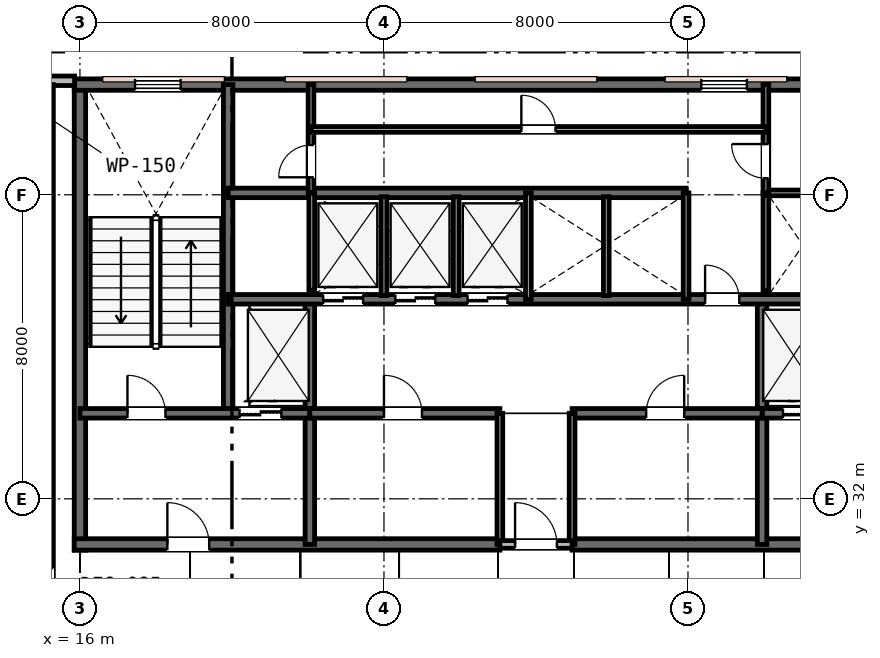
"""IFC4 building model, lengths in metres.
Left out: names, types, materials, properties, quantities, classifications, styles, units other than length and angle.
Written with IfcOpenShell. Run it as: python <this file> out.ifc"""

import sys

from ifc_helpers import new_model, si_unit, direction, frame, frame_2d, origin, place, context, subcontext, project, spatial, rectangle, extrude, element, fill, save


model = new_model("IFC4")
c1 = context("Model", 3, precision=1e-05, world=origin(), true_north=direction((0.0, 1.0)))
c2 = subcontext(c1, "Body", "Model", "MODEL_VIEW")
j1 = project(units=[si_unit("LENGTHUNIT", "METRE"), si_unit("PLANEANGLEUNIT", "RADIAN")], contexts=[c1])
p1 = place(None, origin())
s1 = spatial("IfcSite", under=j1, at=p1, CompositionType="ELEMENT")
p2 = place(p1, origin())
s2 = spatial("IfcBuilding", under=s1, at=p2, CompositionType="ELEMENT")
p3 = place(p2, frame((0.0, 0.0, 283.0)))
s3 = spatial("IfcBuildingStorey", under=s2, at=p3, CompositionType="ELEMENT", Elevation=283.0)
p4 = place(p3, frame((16.0, 30.65, 0.0), z_axis=(0.0, 0.0, 1.0), x_axis=(0.0, 1.0, 0.0)))
e1 = element("IfcWall", 1, at=p4, inside=s3, PredefinedType="SHEAR", context=c2, shape_type="SweptSolid", body=[
    extrude(rectangle(XDim=12.3, YDim=0.3, at=frame_2d((6.15, 0.0))), origin(), (0.0, 0.0, 1.0), 3.8),
])
p5 = place(p3, frame((15.85, 42.9, 0.0), z_axis=(0.0, 0.0, 1.0), x_axis=(1.0, 0.0, 0.0)))
e2 = element("IfcWall", 2, at=p5, inside=s3, PredefinedType="SHEAR", context=c2, shape_type="SweptSolid", body=[
    extrude(rectangle(XDim=24.3, YDim=0.3, at=frame_2d((12.15, 0.0))), origin(), (0.0, 0.0, 1.0), 3.8),
])
p6 = place(p5, frame((1.6, 0.0, 0.95)))
e3 = element("IfcOpeningElement", 3, at=p6, cuts=e2, PredefinedType="OPENING", context=c2, shape_type="SweptSolid", body=[
    extrude(rectangle(XDim=1.2, YDim=1.6, at=frame_2d((0.6, 0.8))), frame((0.0, 0.16, 0.0), z_axis=(0.0, -1.0, 0.0), x_axis=(1.0, 0.0, 0.0)), (0.0, 0.0, 1.0), 0.32),
])
p7 = place(p5, frame((16.5, 0.0, 0.95)))
e4 = element("IfcOpeningElement", 4, at=p7, cuts=e2, PredefinedType="OPENING", context=c2, shape_type="SweptSolid", body=[
    extrude(rectangle(XDim=1.2, YDim=1.6, at=frame_2d((0.6, 0.8))), frame((0.0, 0.16, 0.0), z_axis=(0.0, -1.0, 0.0), x_axis=(1.0, 0.0, 0.0)), (0.0, 0.0, 1.0), 0.32),
])
p8 = place(p5, frame((21.6, 0.0, 0.95)))
e5 = element("IfcOpeningElement", 5, at=p8, cuts=e2, PredefinedType="OPENING", context=c2, shape_type="SweptSolid", body=[
    extrude(rectangle(XDim=1.2, YDim=1.6, at=frame_2d((0.6, 0.8))), frame((0.0, 0.16, 0.0), z_axis=(0.0, -1.0, 0.0), x_axis=(1.0, 0.0, 0.0)), (0.0, 0.0, 1.0), 0.32),
])
p9 = place(p3, frame((15.85, 30.8, 0.0), z_axis=(0.0, 0.0, 1.0), x_axis=(1.0, 0.0, 0.0)))
e6 = element("IfcWall", 6, at=p9, inside=s3, PredefinedType="SHEAR", context=c2, shape_type="SweptSolid", body=[
    extrude(rectangle(XDim=11.2, YDim=0.3, at=frame_2d((5.6, 0.0))), origin(), (0.0, 0.0, 1.0), 3.8),
])
p10 = place(p9, frame((2.45, 0.0, 0.0)))
e7 = element("IfcOpeningElement", 7, at=p10, cuts=e6, PredefinedType="OPENING", context=c2, shape_type="SweptSolid", body=[
    extrude(rectangle(XDim=1.1, YDim=2.15, at=frame_2d((0.55, 1.075))), frame((0.0, 0.16, 0.0), z_axis=(0.0, -1.0, 0.0), x_axis=(1.0, 0.0, 0.0)), (0.0, 0.0, 1.0), 0.32),
])
p11 = place(p3, frame((28.95, 30.8, 0.0), z_axis=(0.0, 0.0, 1.0), x_axis=(1.0, 0.0, 0.0)))
e8 = element("IfcWall", 8, at=p11, inside=s3, PredefinedType="SHEAR", context=c2, shape_type="SweptSolid", body=[
    extrude(rectangle(XDim=11.2, YDim=0.3, at=frame_2d((5.6, 0.0))), origin(), (0.0, 0.0, 1.0), 3.8),
])
p12 = place(p11, frame((7.65, 0.0, 0.0)))
e9 = element("IfcOpeningElement", 9, at=p12, cuts=e8, PredefinedType="OPENING", context=c2, shape_type="SweptSolid", body=[
    extrude(rectangle(XDim=1.1, YDim=2.15, at=frame_2d((0.55, 1.075))), frame((0.0, 0.16, 0.0), z_axis=(0.0, -1.0, 0.0), x_axis=(1.0, 0.0, 0.0)), (0.0, 0.0, 1.0), 0.32),
])
p13 = place(p3, frame((19.9, 34.25, 0.0), z_axis=(0.0, 0.0, 1.0), x_axis=(0.0, 1.0, 0.0)))
e10 = element("IfcWall", 10, at=p13, inside=s3, PredefinedType="SHEAR", context=c2, shape_type="SweptSolid", body=[
    extrude(rectangle(XDim=8.65, YDim=0.25, at=frame_2d((4.325, 0.0))), origin(), (0.0, 0.0, 1.0), 3.8),
])
for number, where, z_axis, x_axis in (
    (11, (22.05, 30.8, 0.0), (0.0, 0.0, 1.0), (0.0, 1.0, 0.0)),
    (12, (33.95, 30.8, 0.0), (0.0, 0.0, 1.0), (0.0, 1.0, 0.0)),
):
    element("IfcWall", number, at=place(p3, frame(where, z_axis=z_axis, x_axis=x_axis)), inside=s3, PredefinedType="SHEAR", context=c2, shape_type="SweptSolid", body=[
        extrude(rectangle(XDim=6.45, YDim=0.25, at=frame_2d((3.225, 0.0))), origin(), (0.0, 0.0, 1.0), 3.8),
    ])
p14 = place(p3, frame((16.0, 34.25, 0.0), z_axis=(0.0, 0.0, 1.0), x_axis=(1.0, 0.0, 0.0)))
e13 = element("IfcWall", 13, at=p14, inside=s3, PredefinedType="SHEAR", context=c2, shape_type="SweptSolid", body=[
    extrude(rectangle(XDim=6.05, YDim=0.25, at=frame_2d((3.025, 0.0))), origin(), (0.0, 0.0, 1.0), 3.8),
])
p15 = place(p14, frame((1.25, 0.0, 0.0)))
e14 = element("IfcOpeningElement", 14, at=p15, cuts=e13, PredefinedType="OPENING", context=c2, shape_type="SweptSolid", body=[
    extrude(rectangle(XDim=1.0, YDim=2.15, at=frame_2d((0.5, 1.075))), frame((0.0, 0.135, 0.0), z_axis=(0.0, -1.0, 0.0), x_axis=(1.0, 0.0, 0.0)), (0.0, 0.0, 1.0), 0.27),
])
p16 = place(p14, frame((4.2, 0.0, 0.0)))
e15 = element("IfcOpeningElement", 15, at=p16, cuts=e13, PredefinedType="OPENING", context=c2, shape_type="SweptSolid", body=[
    extrude(rectangle(XDim=1.1, YDim=2.15, at=frame_2d((0.55, 1.075))), frame((0.0, 0.135, 0.0), z_axis=(0.0, -1.0, 0.0), x_axis=(1.0, 0.0, 0.0)), (0.0, 0.0, 1.0), 0.27),
])
p17 = place(p3, frame((33.95, 34.25, 0.0), z_axis=(0.0, 0.0, 1.0), x_axis=(1.0, 0.0, 0.0)))
e16 = element("IfcWall", 16, at=p17, inside=s3, PredefinedType="SHEAR", context=c2, shape_type="SweptSolid", body=[
    extrude(rectangle(XDim=6.05, YDim=0.25, at=frame_2d((3.025, 0.0))), origin(), (0.0, 0.0, 1.0), 3.8),
])
p18 = place(p17, frame((3.7, 0.0, 0.0)))
e17 = element("IfcOpeningElement", 17, at=p18, cuts=e16, PredefinedType="OPENING", context=c2, shape_type="SweptSolid", body=[
    extrude(rectangle(XDim=1.0, YDim=2.15, at=frame_2d((0.5, 1.075))), frame((0.0, 0.135, 0.0), z_axis=(0.0, -1.0, 0.0), x_axis=(1.0, 0.0, 0.0)), (0.0, 0.0, 1.0), 0.27),
])
p19 = place(p17, frame((0.55, 0.0, 0.0)))
e18 = element("IfcOpeningElement", 18, at=p19, cuts=e16, PredefinedType="OPENING", context=c2, shape_type="SweptSolid", body=[
    extrude(rectangle(XDim=1.1, YDim=2.15, at=frame_2d((0.55, 1.075))), frame((0.0, 0.135, 0.0), z_axis=(0.0, -1.0, 0.0), x_axis=(1.0, 0.0, 0.0)), (0.0, 0.0, 1.0), 0.27),
])
p20 = place(p3, frame((22.05, 34.25, 0.0), z_axis=(0.0, 0.0, 1.0), x_axis=(1.0, 0.0, 0.0)))
e19 = element("IfcWall", 19, at=p20, inside=s3, PredefinedType="SHEAR", context=c2, shape_type="SweptSolid", body=[
    extrude(rectangle(XDim=5.0, YDim=0.25, at=frame_2d((2.5, 0.0))), origin(), (0.0, 0.0, 1.0), 3.8),
])
p21 = place(p20, frame((1.95, 0.0, 0.0)))
e20 = element("IfcOpeningElement", 20, at=p21, cuts=e19, PredefinedType="OPENING", context=c2, shape_type="SweptSolid", body=[
    extrude(rectangle(XDim=1.0, YDim=2.15, at=frame_2d((0.5, 1.075))), frame((0.0, 0.135, 0.0), z_axis=(0.0, -1.0, 0.0), x_axis=(1.0, 0.0, 0.0)), (0.0, 0.0, 1.0), 0.27),
])
p22 = place(p3, frame((28.95, 34.25, 0.0), z_axis=(0.0, 0.0, 1.0), x_axis=(1.0, 0.0, 0.0)))
e21 = element("IfcWall", 21, at=p22, inside=s3, PredefinedType="SHEAR", context=c2, shape_type="SweptSolid", body=[
    extrude(rectangle(XDim=5.0, YDim=0.25, at=frame_2d((2.5, 0.0))), origin(), (0.0, 0.0, 1.0), 3.8),
])
p23 = place(p22, frame((1.95, 0.0, 0.0)))
e22 = element("IfcOpeningElement", 22, at=p23, cuts=e21, PredefinedType="OPENING", context=c2, shape_type="SweptSolid", body=[
    extrude(rectangle(XDim=1.0, YDim=2.15, at=frame_2d((0.5, 1.075))), frame((0.0, 0.135, 0.0), z_axis=(0.0, -1.0, 0.0), x_axis=(1.0, 0.0, 0.0)), (0.0, 0.0, 1.0), 0.27),
])
p24 = place(p3, frame((19.9, 37.25, 0.0), z_axis=(0.0, 0.0, 1.0), x_axis=(1.0, 0.0, 0.0)))
e23 = element("IfcWall", 23, at=p24, inside=s3, PredefinedType="SHEAR", context=c2, shape_type="SweptSolid", body=[
    extrude(rectangle(XDim=16.2, YDim=0.25, at=frame_2d((8.1, 0.0))), origin(), (0.0, 0.0, 1.0), 3.8),
])
p25 = place(p24, frame((12.55, 0.0, 0.0)))
e24 = element("IfcOpeningElement", 24, at=p25, cuts=e23, PredefinedType="OPENING", context=c2, shape_type="SweptSolid", body=[
    extrude(rectangle(XDim=0.9, YDim=2.15, at=frame_2d((0.45, 1.075))), frame((0.0, 0.135, 0.0), z_axis=(0.0, -1.0, 0.0), x_axis=(1.0, 0.0, 0.0)), (0.0, 0.0, 1.0), 0.27),
])
p26 = place(p24, frame((2.5, 0.0, 0.0)))
e25 = element("IfcOpeningElement", 25, at=p26, cuts=e23, PredefinedType="OPENING", context=c2, shape_type="SweptSolid", body=[
    extrude(rectangle(XDim=1.05, YDim=2.15, at=frame_2d((0.525, 1.075))), frame((0.0, 0.135, 0.0), z_axis=(0.0, -1.0, 0.0), x_axis=(1.0, 0.0, 0.0)), (0.0, 0.0, 1.0), 0.27),
])
p27 = place(p24, frame((4.4, 0.0, 0.0)))
e26 = element("IfcOpeningElement", 26, at=p27, cuts=e23, PredefinedType="OPENING", context=c2, shape_type="SweptSolid", body=[
    extrude(rectangle(XDim=1.05, YDim=2.15, at=frame_2d((0.525, 1.075))), frame((0.0, 0.135, 0.0), z_axis=(0.0, -1.0, 0.0), x_axis=(1.0, 0.0, 0.0)), (0.0, 0.0, 1.0), 0.27),
])
p28 = place(p24, frame((6.3, 0.0, 0.0)))
e27 = element("IfcOpeningElement", 27, at=p28, cuts=e23, PredefinedType="OPENING", context=c2, shape_type="SweptSolid", body=[
    extrude(rectangle(XDim=1.05, YDim=2.15, at=frame_2d((0.525, 1.075))), frame((0.0, 0.135, 0.0), z_axis=(0.0, -1.0, 0.0), x_axis=(1.0, 0.0, 0.0)), (0.0, 0.0, 1.0), 0.27),
])
p29 = place(p3, frame((19.9, 40.05, 0.0), z_axis=(0.0, 0.0, 1.0), x_axis=(1.0, 0.0, 0.0)))
e28 = element("IfcWall", 28, at=p29, inside=s3, PredefinedType="SHEAR", context=c2, shape_type="SweptSolid", body=[
    extrude(rectangle(XDim=12.05, YDim=0.25, at=frame_2d((6.025, 0.0))), origin(), (0.0, 0.0, 1.0), 3.8),
])
p30 = place(p3, frame((15.86, 43.0, 0.0), z_axis=(0.0, 0.0, 1.0), x_axis=(-1.0, 0.0, 0.0)))
e29 = element("IfcWall", 29, at=p30, inside=s3, PredefinedType="STANDARD", context=c2, shape_type="SweptSolid", body=[
    extrude(rectangle(XDim=4.06, YDim=0.25, at=frame_2d((2.03, 0.0))), origin(), (0.0, 0.0, 1.0), 3.53),
])
p31 = place(p30, frame((1.2, 0.0, 0.85)))
e30 = element("IfcOpeningElement", 30, at=p31, cuts=e29, PredefinedType="OPENING", context=c2, shape_type="SweptSolid", body=[
    extrude(rectangle(XDim=1.2, YDim=1.6, at=frame_2d((0.6, 0.8))), frame((0.0, 0.135, 0.0), z_axis=(0.0, -1.0, 0.0), x_axis=(1.0, 0.0, 0.0)), (0.0, 0.0, 1.0), 0.27),
])
for number, where, z_axis, x_axis in (
    (31, (27.05, 30.8, 0.0), (0.0, 0.0, 1.0), (0.0, 1.0, 0.0)),
    (32, (28.95, 30.8, 0.0), (0.0, 0.0, 1.0), (0.0, 1.0, 0.0)),
):
    element("IfcWall", number, at=place(p3, frame(where, z_axis=z_axis, x_axis=x_axis)), inside=s3, PredefinedType="PLUMBINGWALL", context=c2, shape_type="SweptSolid", body=[
        extrude(rectangle(XDim=3.45, YDim=0.15, at=frame_2d((1.725, 0.0))), origin(), (0.0, 0.0, 1.0), 3.33),
    ])
p32 = place(p3, frame((27.05, 30.8, 0.0), z_axis=(0.0, 0.0, 1.0), x_axis=(1.0, 0.0, 0.0)))
e33 = element("IfcWall", 33, at=p32, inside=s3, PredefinedType="PARTITIONING", context=c2, shape_type="SweptSolid", body=[
    extrude(rectangle(XDim=1.9, YDim=0.2, at=frame_2d((0.95, 0.0))), origin(), (0.0, 0.0, 1.0), 3.33),
])
p33 = place(p32, frame((0.4, 0.0, 0.0)))
e34 = element("IfcOpeningElement", 34, at=p33, cuts=e33, PredefinedType="OPENING", context=c2, shape_type="SweptSolid", body=[
    extrude(rectangle(XDim=1.1, YDim=2.15, at=frame_2d((0.55, 1.075))), frame((0.0, 0.11, 0.0), z_axis=(0.0, -1.0, 0.0), x_axis=(1.0, 0.0, 0.0)), (0.0, 0.0, 1.0), 0.22),
])
p34 = place(p3, frame((22.1, 37.49, 0.0), z_axis=(0.0, 0.0, 1.0), x_axis=(0.0, 1.0, 0.0)))
e35 = element("IfcWall", 35, at=p34, inside=s3, PredefinedType="PLUMBINGWALL", context=c2, shape_type="SweptSolid", body=[
    extrude(rectangle(XDim=2.56, YDim=0.15, at=frame_2d((1.28, 0.0))), origin(), (0.0, 0.0, 1.0), 3.53),
])
p35 = place(p3, frame((27.8, 37.25, 0.0), z_axis=(0.0, 0.0, 1.0), x_axis=(0.0, 1.0, 0.0)))
e36 = element("IfcWall", 36, at=p35, inside=s3, PredefinedType="PLUMBINGWALL", context=c2, shape_type="SweptSolid", body=[
    extrude(rectangle(XDim=2.8, YDim=0.15, at=frame_2d((1.4, 0.0))), origin(), (0.0, 0.0, 1.0), 3.53),
])
for number, where, z_axis, x_axis in (
    (37, (24.0, 37.35, 0.0), (0.0, 0.0, 1.0), (0.0, 1.0, 0.0)),
    (38, (25.9, 37.35, 0.0), (0.0, 0.0, 1.0), (0.0, 1.0, 0.0)),
):
    element("IfcWall", number, at=place(p3, frame(where, z_axis=z_axis, x_axis=x_axis)), inside=s3, PredefinedType="PLUMBINGWALL", context=c2, shape_type="SweptSolid", body=[
        extrude(rectangle(XDim=2.6, YDim=0.15, at=frame_2d((1.3, 0.0))), origin(), (0.0, 0.0, 1.0), 3.53),
    ])
p36 = place(p3, frame((31.95, 37.25, 0.0), z_axis=(0.0, 0.0, 1.0), x_axis=(0.0, 1.0, 0.0)))
e39 = element("IfcWall", 39, at=p36, inside=s3, PredefinedType="PLUMBINGWALL", context=c2, shape_type="SweptSolid", body=[
    extrude(rectangle(XDim=2.8, YDim=0.15, at=frame_2d((1.4, 0.0))), origin(), (0.0, 0.0, 1.0), 3.53),
])
p37 = place(p3, frame((29.85, 37.35, 0.0), z_axis=(0.0, 0.0, 1.0), x_axis=(0.0, 1.0, 0.0)))
e40 = element("IfcWall", 40, at=p37, inside=s3, PredefinedType="PLUMBINGWALL", context=c2, shape_type="SweptSolid", body=[
    extrude(rectangle(XDim=2.6, YDim=0.15, at=frame_2d((1.3, 0.0))), origin(), (0.0, 0.0, 1.0), 3.53),
])
p38 = place(p3, frame((34.05, 37.473, 0.0), z_axis=(0.0, 0.0, 1.0), x_axis=(0.0, 1.0, 0.0)))
e41 = element("IfcWall", 41, at=p38, inside=s3, PredefinedType="PLUMBINGWALL", context=c2, shape_type="SweptSolid", body=[
    extrude(rectangle(XDim=2.577, YDim=0.15, at=frame_2d((1.288, 0.0))), origin(), (0.0, 0.0, 1.0), 3.53),
])
p39 = place(p3, frame((34.05, 40.05, 0.0), z_axis=(0.0, 0.0, 1.0), x_axis=(1.0, 0.0, 0.0)))
e42 = element("IfcWall", 42, at=p39, inside=s3, PredefinedType="PARTITIONING", context=c2, shape_type="SweptSolid", body=[
    extrude(rectangle(XDim=2.05, YDim=0.15, at=frame_2d((1.025, 0.0))), origin(), (0.0, 0.0, 1.0), 3.53),
])
p40 = place(p3, frame((34.05, 40.05, 0.0), z_axis=(0.0, 0.0, 1.0), x_axis=(0.0, 1.0, 0.0)))
e43 = element("IfcWall", 43, at=p40, inside=s3, PredefinedType="PARTITIONING", context=c2, shape_type="SweptSolid", body=[
    extrude(rectangle(XDim=2.85, YDim=0.15, at=frame_2d((1.425, 0.0))), origin(), (0.0, 0.0, 1.0), 3.53),
])
p41 = place(p40, frame((0.385, 0.0, 0.0)))
e44 = element("IfcOpeningElement", 44, at=p41, cuts=e43, PredefinedType="OPENING", context=c2, shape_type="SweptSolid", body=[
    extrude(rectangle(XDim=0.9, YDim=2.15, at=frame_2d((0.45, 1.075))), frame((0.0, 0.085, 0.0), z_axis=(0.0, -1.0, 0.0), x_axis=(1.0, 0.0, 0.0)), (0.0, 0.0, 1.0), 0.17),
])
p42 = place(p3, frame((22.08, 40.05, 0.0), z_axis=(0.0, 0.0, 1.0), x_axis=(0.0, 1.0, 0.0)))
e45 = element("IfcWall", 45, at=p42, inside=s3, PredefinedType="PARTITIONING", context=c2, shape_type="SweptSolid", body=[
    extrude(rectangle(XDim=2.85, YDim=0.15, at=frame_2d((1.425, 0.0))), origin(), (0.0, 0.0, 1.0), 3.53),
])
p43 = place(p42, frame((0.41, 0.0, 0.0)))
e46 = element("IfcOpeningElement", 46, at=p43, cuts=e45, PredefinedType="OPENING", context=c2, shape_type="SweptSolid", body=[
    extrude(rectangle(XDim=0.85, YDim=2.15, at=frame_2d((0.425, 1.075))), frame((0.0, 0.085, 0.0), z_axis=(0.0, -1.0, 0.0), x_axis=(1.0, 0.0, 0.0)), (0.0, 0.0, 1.0), 0.17),
])
p44 = place(p3, frame((22.08, 41.72, 0.0), z_axis=(0.0, 0.0, 1.0), x_axis=(1.0, 0.0, 0.0)))
e47 = element("IfcWall", 47, at=p44, inside=s3, PredefinedType="PARTITIONING", context=c2, shape_type="SweptSolid", body=[
    extrude(rectangle(XDim=11.97, YDim=0.15, at=frame_2d((5.985, 0.0))), origin(), (0.0, 0.0, 1.0), 3.53),
])
p45 = place(p44, frame((5.535, 0.0, 0.0)))
e48 = element("IfcOpeningElement", 48, at=p45, cuts=e47, PredefinedType="OPENING", context=c2, shape_type="SweptSolid", body=[
    extrude(rectangle(XDim=0.9, YDim=2.15, at=frame_2d((0.45, 1.075))), frame((0.0, 0.085, 0.0), z_axis=(0.0, -1.0, 0.0), x_axis=(1.0, 0.0, 0.0)), (0.0, 0.0, 1.0), 0.17),
])
p46 = place(p3, frame((15.2, 28.6, 0.0), z_axis=(0.0, 0.0, 1.0), x_axis=(0.0, 1.0, 0.0)))
e49 = element("IfcWall", 49, at=p46, inside=s3, PredefinedType="PARTITIONING", context=c2, shape_type="SweptSolid", body=[
    extrude(rectangle(XDim=14.3, YDim=0.2, at=frame_2d((7.15, 0.0))), origin(), (0.0, 0.0, 1.0), 3.53),
])
p47 = place(p46, frame((0.625, 0.0, 0.0)))
e50 = element("IfcOpeningElement", 50, at=p47, cuts=e49, PredefinedType="OPENING", context=c2, shape_type="SweptSolid", body=[
    extrude(rectangle(XDim=0.95, YDim=2.15, at=frame_2d((0.475, 1.075))), frame((0.0, 0.11, 0.0), z_axis=(0.0, -1.0, 0.0), x_axis=(1.0, 0.0, 0.0)), (0.0, 0.0, 1.0), 0.22),
])
p48 = place(p6, origin())
e51 = element("IfcWindow", 51, at=p48, inside=s3, PartitioningType="SINGLE_PANEL", PredefinedType="WINDOW", context=c2, shape_type="SweptSolid", body=[
    extrude(rectangle(XDim=1.2, YDim=1.6, at=frame_2d((0.6, 0.8))), frame((0.0, 0.03, 0.0), z_axis=(0.0, -1.0, 0.0), x_axis=(1.0, 0.0, 0.0)), (0.0, 0.0, 1.0), 0.06),
])
fill(e3, e51)
p49 = place(p7, origin())
e52 = element("IfcWindow", 52, at=p49, inside=s3, PartitioningType="SINGLE_PANEL", PredefinedType="WINDOW", context=c2, shape_type="SweptSolid", body=[
    extrude(rectangle(XDim=1.2, YDim=1.6, at=frame_2d((0.6, 0.8))), frame((0.0, 0.03, 0.0), z_axis=(0.0, -1.0, 0.0), x_axis=(1.0, 0.0, 0.0)), (0.0, 0.0, 1.0), 0.06),
])
fill(e4, e52)
p50 = place(p33, origin())
e53 = element("IfcDoor", 53, at=p50, inside=s3, OperationType="SINGLE_SWING_LEFT", PredefinedType="DOOR", context=c2, shape_type="SweptSolid", body=[
    extrude(rectangle(XDim=1.1, YDim=2.15, at=frame_2d((0.55, 1.075))), frame((0.0, 0.025, 0.0), z_axis=(0.0, -1.0, 0.0), x_axis=(1.0, 0.0, 0.0)), (0.0, 0.0, 1.0), 0.05),
])
fill(e34, e53)
p51 = place(p15, origin())
e54 = element("IfcDoor", 54, at=p51, inside=s3, OperationType="SINGLE_SWING_LEFT", PredefinedType="DOOR", context=c2, shape_type="SweptSolid", body=[
    extrude(rectangle(XDim=1.0, YDim=2.15, at=frame_2d((0.5, 1.075))), frame((0.0, 0.025, 0.0), z_axis=(0.0, -1.0, 0.0), x_axis=(1.0, 0.0, 0.0)), (0.0, 0.0, 1.0), 0.05),
])
fill(e14, e54)
p52 = place(p10, origin())
e55 = element("IfcDoor", 55, at=p52, inside=s3, OperationType="SINGLE_SWING_LEFT", PredefinedType="DOOR", context=c2, shape_type="SweptSolid", body=[
    extrude(rectangle(XDim=1.1, YDim=2.15, at=frame_2d((0.55, 1.075))), frame((0.0, 0.025, 0.0), z_axis=(0.0, -1.0, 0.0), x_axis=(1.0, 0.0, 0.0)), (0.0, 0.0, 1.0), 0.05),
])
fill(e7, e55)
p53 = place(p21, origin())
e56 = element("IfcDoor", 56, at=p53, inside=s3, OperationType="SINGLE_SWING_LEFT", PredefinedType="DOOR", context=c2, shape_type="SweptSolid", body=[
    extrude(rectangle(XDim=1.0, YDim=2.15, at=frame_2d((0.5, 1.075))), frame((0.0, 0.025, 0.0), z_axis=(0.0, -1.0, 0.0), x_axis=(1.0, 0.0, 0.0)), (0.0, 0.0, 1.0), 0.05),
])
fill(e20, e56)
p54 = place(p23, origin())
e57 = element("IfcDoor", 57, at=p54, inside=s3, OperationType="SINGLE_SWING_RIGHT", PredefinedType="DOOR", context=c2, shape_type="SweptSolid", body=[
    extrude(rectangle(XDim=1.0, YDim=2.15, at=frame_2d((0.5, 1.075))), frame((0.0, 0.025, 0.0), z_axis=(0.0, -1.0, 0.0), x_axis=(1.0, 0.0, 0.0)), (0.0, 0.0, 1.0), 0.05),
])
fill(e22, e57)
p55 = place(p25, origin())
e58 = element("IfcDoor", 58, at=p55, inside=s3, OperationType="SINGLE_SWING_LEFT", PredefinedType="DOOR", context=c2, shape_type="SweptSolid", body=[
    extrude(rectangle(XDim=0.9, YDim=2.15, at=frame_2d((0.45, 1.075))), frame((0.0, 0.025, 0.0), z_axis=(0.0, -1.0, 0.0), x_axis=(1.0, 0.0, 0.0)), (0.0, 0.0, 1.0), 0.05),
])
fill(e24, e58)
p56 = place(p41, origin())
e59 = element("IfcDoor", 59, at=p56, inside=s3, OperationType="SINGLE_SWING_RIGHT", PredefinedType="DOOR", context=c2, shape_type="SweptSolid", body=[
    extrude(rectangle(XDim=0.9, YDim=2.15, at=frame_2d((0.45, 1.075))), frame((0.0, 0.025, 0.0), z_axis=(0.0, -1.0, 0.0), x_axis=(1.0, 0.0, 0.0)), (0.0, 0.0, 1.0), 0.05),
])
fill(e44, e59)
p57 = place(p43, origin())
e60 = element("IfcDoor", 60, at=p57, inside=s3, OperationType="SINGLE_SWING_LEFT", PredefinedType="DOOR", context=c2, shape_type="SweptSolid", body=[
    extrude(rectangle(XDim=0.85, YDim=2.15, at=frame_2d((0.425, 1.075))), frame((0.0, 0.025, 0.0), z_axis=(0.0, -1.0, 0.0), x_axis=(1.0, 0.0, 0.0)), (0.0, 0.0, 1.0), 0.05),
])
fill(e46, e60)
p58 = place(p45, origin())
e61 = element("IfcDoor", 61, at=p58, inside=s3, OperationType="SINGLE_SWING_LEFT", PredefinedType="DOOR", context=c2, shape_type="SweptSolid", body=[
    extrude(rectangle(XDim=0.9, YDim=2.15, at=frame_2d((0.45, 1.075))), frame((0.0, 0.025, 0.0), z_axis=(0.0, -1.0, 0.0), x_axis=(1.0, 0.0, 0.0)), (0.0, 0.0, 1.0), 0.05),
])
fill(e48, e61)
p59 = place(p16, origin())
e62 = element("IfcDoor", 62, at=p59, inside=s3, OperationType="DOUBLE_DOOR_SLIDING", PredefinedType="DOOR", context=c2, shape_type="SweptSolid", body=[
    extrude(rectangle(XDim=1.1, YDim=2.15, at=frame_2d((0.55, 1.075))), frame((0.0, 0.025, 0.0), z_axis=(0.0, -1.0, 0.0), x_axis=(1.0, 0.0, 0.0)), (0.0, 0.0, 1.0), 0.05),
])
fill(e15, e62)
p60 = place(p19, origin())
e63 = element("IfcDoor", 63, at=p60, inside=s3, OperationType="DOUBLE_DOOR_SLIDING", PredefinedType="DOOR", context=c2, shape_type="SweptSolid", body=[
    extrude(rectangle(XDim=1.1, YDim=2.15, at=frame_2d((0.55, 1.075))), frame((0.0, 0.025, 0.0), z_axis=(0.0, -1.0, 0.0), x_axis=(1.0, 0.0, 0.0)), (0.0, 0.0, 1.0), 0.05),
])
fill(e18, e63)
p61 = place(p26, origin())
e64 = element("IfcDoor", 64, at=p61, inside=s3, OperationType="DOUBLE_DOOR_SLIDING", PredefinedType="DOOR", context=c2, shape_type="SweptSolid", body=[
    extrude(rectangle(XDim=1.05, YDim=2.15, at=frame_2d((0.525, 1.075))), frame((0.0, 0.025, 0.0), z_axis=(0.0, -1.0, 0.0), x_axis=(1.0, 0.0, 0.0)), (0.0, 0.0, 1.0), 0.05),
])
fill(e25, e64)
p62 = place(p27, origin())
e65 = element("IfcDoor", 65, at=p62, inside=s3, OperationType="DOUBLE_DOOR_SLIDING", PredefinedType="DOOR", context=c2, shape_type="SweptSolid", body=[
    extrude(rectangle(XDim=1.05, YDim=2.15, at=frame_2d((0.525, 1.075))), frame((0.0, 0.025, 0.0), z_axis=(0.0, -1.0, 0.0), x_axis=(1.0, 0.0, 0.0)), (0.0, 0.0, 1.0), 0.05),
])
fill(e26, e65)
p63 = place(p28, origin())
e66 = element("IfcDoor", 66, at=p63, inside=s3, OperationType="DOUBLE_DOOR_SLIDING", PredefinedType="DOOR", context=c2, shape_type="SweptSolid", body=[
    extrude(rectangle(XDim=1.05, YDim=2.15, at=frame_2d((0.525, 1.075))), frame((0.0, 0.025, 0.0), z_axis=(0.0, -1.0, 0.0), x_axis=(1.0, 0.0, 0.0)), (0.0, 0.0, 1.0), 0.05),
])
fill(e27, e66)
save(model, sys.argv[1])
